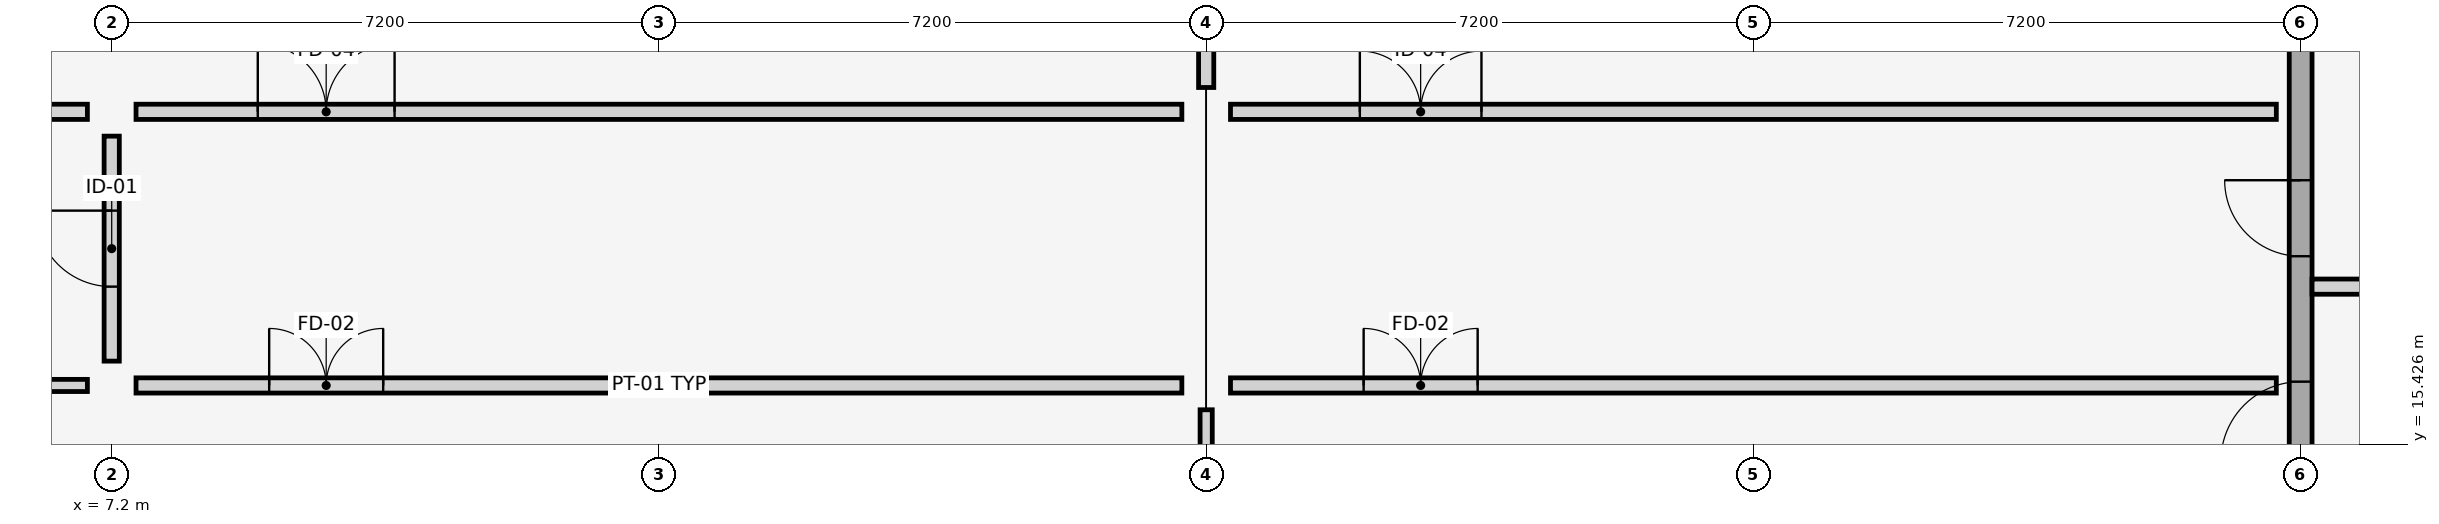
"""IFC4 building model, lengths in metres.
Left out: names, types, materials, properties, quantities, classifications, styles, units other than length and angle.
Written with IfcOpenShell. Run it as: python <this file> out.ifc"""

import sys

from ifc_helpers import new_model, si_unit, direction, frame, frame_2d, origin, place, context, subcontext, project, spatial, rectangle, extrude, element, fill, save


model = new_model("IFC4")
c1 = context("Model", 3, precision=1e-05, world=origin(), true_north=direction((0.0, 1.0)))
c2 = subcontext(c1, "Body", "Model", "MODEL_VIEW")
j1 = project(units=[si_unit("LENGTHUNIT", "METRE"), si_unit("PLANEANGLEUNIT", "RADIAN")], contexts=[c1])
p1 = place(None, origin())
s1 = spatial("IfcSite", under=j1, at=p1, CompositionType="ELEMENT")
p2 = place(p1, origin())
s2 = spatial("IfcBuilding", under=s1, at=p2, CompositionType="ELEMENT")
p3 = place(p2, frame((0.0, 0.0, -4.5)))
s3 = spatial("IfcBuildingStorey", under=s2, at=p3, CompositionType="ELEMENT", Elevation=-4.5)
p4 = place(p3, frame((36.0, 7.35, 0.0), z_axis=(0.0, 0.0, 1.0), x_axis=(0.0, 1.0, 0.0)))
e1 = element("IfcWall", 1, at=p4, inside=s3, PredefinedType="SHEAR", context=c2, shape_type="SweptSolid", body=[
    extrude(rectangle(XDim=14.1, YDim=0.3, at=frame_2d((7.05, 0.0))), origin(), (0.0, 0.0, 1.0), 4.25),
])
p5 = place(p4, frame((3.55, 0.0, 0.0)))
e2 = element("IfcOpeningElement", 2, at=p5, cuts=e1, PredefinedType="OPENING", context=c2, shape_type="SweptSolid", body=[
    extrude(rectangle(XDim=1.3, YDim=2.2, at=frame_2d((0.65, 1.1))), frame((0.0, 0.16, 0.0), z_axis=(0.0, -1.0, 0.0), x_axis=(1.0, 0.0, 0.0)), (0.0, 0.0, 1.0), 0.32),
])
p6 = place(p4, frame((7.85, 0.0, 0.0)))
e3 = element("IfcOpeningElement", 3, at=p6, cuts=e1, PredefinedType="OPENING", context=c2, shape_type="SweptSolid", body=[
    extrude(rectangle(XDim=1.05, YDim=2.15, at=frame_2d((0.525, 1.075))), frame((0.0, 0.16, 0.0), z_axis=(0.0, -1.0, 0.0), x_axis=(1.0, 0.0, 0.0)), (0.0, 0.0, 1.0), 0.32),
])
p7 = place(p4, frame((10.55, 0.0, 0.0)))
e4 = element("IfcOpeningElement", 4, at=p7, cuts=e1, PredefinedType="OPENING", context=c2, shape_type="SweptSolid", body=[
    extrude(rectangle(XDim=1.0, YDim=2.15, at=frame_2d((0.5, 1.075))), frame((0.0, 0.16, 0.0), z_axis=(0.0, -1.0, 0.0), x_axis=(1.0, 0.0, 0.0)), (0.0, 0.0, 1.0), 0.32),
])
p8 = place(p3, frame((36.15, 17.5, 0.0), z_axis=(0.0, 0.0, 1.0), x_axis=(1.0, 0.0, 0.0)))
e5 = element("IfcWall", 5, at=p8, inside=s3, PredefinedType="PLUMBINGWALL", context=c2, shape_type="SweptSolid", body=[
    extrude(rectangle(XDim=3.55, YDim=0.2, at=frame_2d((1.775, 0.0))), origin(), (0.0, 0.0, 1.0), 3.67),
])
p9 = place(p3, frame((7.52, 16.2, 0.0), z_axis=(0.0, 0.0, 1.0), x_axis=(1.0, 0.0, 0.0)))
e6 = element("IfcWall", 6, at=p9, inside=s3, PredefinedType="PARTITIONING", context=c2, shape_type="SweptSolid", body=[
    extrude(rectangle(XDim=13.76, YDim=0.2, at=frame_2d((6.88, 0.0))), origin(), (0.0, 0.0, 1.0), 3.45),
])
p10 = place(p9, frame((1.752, 0.0, 0.0)))
e7 = element("IfcOpeningElement", 7, at=p10, cuts=e6, PredefinedType="OPENING", context=c2, shape_type="SweptSolid", body=[
    extrude(rectangle(XDim=1.5, YDim=2.25, at=frame_2d((0.75, 1.125))), frame((0.0, 0.11, 0.0), z_axis=(0.0, -1.0, 0.0), x_axis=(1.0, 0.0, 0.0)), (0.0, 0.0, 1.0), 0.22),
])
p11 = place(p3, frame((7.52, 19.8, 0.0), z_axis=(0.0, 0.0, 1.0), x_axis=(1.0, 0.0, 0.0)))
e8 = element("IfcWall", 8, at=p11, inside=s3, PredefinedType="PARTITIONING", context=c2, shape_type="SweptSolid", body=[
    extrude(rectangle(XDim=13.76, YDim=0.2, at=frame_2d((6.88, 0.0))), origin(), (0.0, 0.0, 1.0), 3.45),
])
p12 = place(p11, frame((1.602, 0.0, 0.0)))
e9 = element("IfcOpeningElement", 9, at=p12, cuts=e8, PredefinedType="OPENING", context=c2, shape_type="SweptSolid", body=[
    extrude(rectangle(XDim=1.8, YDim=2.4, at=frame_2d((0.9, 1.2))), frame((0.0, 0.11, 0.0), z_axis=(0.0, -1.0, 0.0), x_axis=(1.0, 0.0, 0.0)), (0.0, 0.0, 1.0), 0.22),
])
p13 = place(p3, frame((7.2, 16.52, 0.0), z_axis=(0.0, 0.0, 1.0), x_axis=(0.0, 1.0, 0.0)))
e10 = element("IfcWall", 10, at=p13, inside=s3, PredefinedType="PARTITIONING", context=c2, shape_type="SweptSolid", body=[
    extrude(rectangle(XDim=2.96, YDim=0.2, at=frame_2d((1.48, 0.0))), origin(), (0.0, 0.0, 1.0), 3.45),
])
p14 = place(p13, frame((0.98, 0.0, 0.0)))
e11 = element("IfcOpeningElement", 11, at=p14, cuts=e10, PredefinedType="OPENING", context=c2, shape_type="SweptSolid", body=[
    extrude(rectangle(XDim=1.0, YDim=2.15, at=frame_2d((0.5, 1.075))), frame((0.0, 0.11, 0.0), z_axis=(0.0, -1.0, 0.0), x_axis=(1.0, 0.0, 0.0)), (0.0, 0.0, 1.0), 0.22),
])
p15 = place(p3, frame((21.92, 16.2, 0.0), z_axis=(0.0, 0.0, 1.0), x_axis=(1.0, 0.0, 0.0)))
e12 = element("IfcWall", 12, at=p15, inside=s3, PredefinedType="PARTITIONING", context=c2, shape_type="SweptSolid", body=[
    extrude(rectangle(XDim=13.76, YDim=0.2, at=frame_2d((6.88, 0.0))), origin(), (0.0, 0.0, 1.0), 3.45),
])
p16 = place(p15, frame((1.752, 0.0, 0.0)))
e13 = element("IfcOpeningElement", 13, at=p16, cuts=e12, PredefinedType="OPENING", context=c2, shape_type="SweptSolid", body=[
    extrude(rectangle(XDim=1.5, YDim=2.25, at=frame_2d((0.75, 1.125))), frame((0.0, 0.11, 0.0), z_axis=(0.0, -1.0, 0.0), x_axis=(1.0, 0.0, 0.0)), (0.0, 0.0, 1.0), 0.22),
])
p17 = place(p3, frame((21.92, 19.8, 0.0), z_axis=(0.0, 0.0, 1.0), x_axis=(1.0, 0.0, 0.0)))
e14 = element("IfcWall", 14, at=p17, inside=s3, PredefinedType="PARTITIONING", context=c2, shape_type="SweptSolid", body=[
    extrude(rectangle(XDim=13.76, YDim=0.2, at=frame_2d((6.88, 0.0))), origin(), (0.0, 0.0, 1.0), 3.45),
])
p18 = place(p17, frame((1.702, 0.0, 0.0)))
e15 = element("IfcOpeningElement", 15, at=p18, cuts=e14, PredefinedType="OPENING", context=c2, shape_type="SweptSolid", body=[
    extrude(rectangle(XDim=1.6, YDim=2.35, at=frame_2d((0.8, 1.175))), frame((0.0, 0.11, 0.0), z_axis=(0.0, -1.0, 0.0), x_axis=(1.0, 0.0, 0.0)), (0.0, 0.0, 1.0), 0.22),
])
p19 = place(p3, frame((0.32, 16.2, 0.0), z_axis=(0.0, 0.0, 1.0), x_axis=(1.0, 0.0, 0.0)))
e16 = element("IfcWall", 16, at=p19, inside=s3, PredefinedType="PARTITIONING", context=c2, shape_type="SweptSolid", body=[
    extrude(rectangle(XDim=6.56, YDim=0.16, at=frame_2d((3.28, 0.0))), origin(), (0.0, 0.0, 1.0), 3.45),
])
p20 = place(p19, frame((2.155, 0.0, 0.0)))
e17 = element("IfcOpeningElement", 17, at=p20, cuts=e16, PredefinedType="OPENING", context=c2, shape_type="SweptSolid", body=[
    extrude(rectangle(XDim=2.25, YDim=2.7, at=frame_2d((1.125, 1.35))), frame((0.0, 0.09, 0.0), z_axis=(0.0, -1.0, 0.0), x_axis=(1.0, 0.0, 0.0)), (0.0, 0.0, 1.0), 0.18),
])
p21 = place(p3, frame((21.6, 0.32, 0.0), z_axis=(0.0, 0.0, 1.0), x_axis=(0.0, 1.0, 0.0)))
e18 = element("IfcWall", 18, at=p21, inside=s3, PredefinedType="PARTITIONING", context=c2, shape_type="SweptSolid", body=[
    extrude(rectangle(XDim=15.56, YDim=0.16, at=frame_2d((7.78, 0.0))), origin(), (0.0, 0.0, 1.0), 3.45),
])
p22 = place(p21, frame((1.843, 0.0, 0.0)))
e19 = element("IfcOpeningElement", 19, at=p22, cuts=e18, PredefinedType="OPENING", context=c2, shape_type="SweptSolid", body=[
    extrude(rectangle(XDim=1.5, YDim=2.25, at=frame_2d((0.75, 1.125))), frame((0.0, 0.09, 0.0), z_axis=(0.0, -1.0, 0.0), x_axis=(1.0, 0.0, 0.0)), (0.0, 0.0, 1.0), 0.18),
])
p23 = place(p3, frame((0.32, 19.8, 0.0), z_axis=(0.0, 0.0, 1.0), x_axis=(1.0, 0.0, 0.0)))
e20 = element("IfcWall", 20, at=p23, inside=s3, PredefinedType="PARTITIONING", context=c2, shape_type="SweptSolid", body=[
    extrude(rectangle(XDim=6.56, YDim=0.2, at=frame_2d((3.28, 0.0))), origin(), (0.0, 0.0, 1.0), 3.45),
])
p24 = place(p23, frame((2.38, 0.0, 0.0)))
e21 = element("IfcOpeningElement", 21, at=p24, cuts=e20, PredefinedType="OPENING", context=c2, shape_type="SweptSolid", body=[
    extrude(rectangle(XDim=1.8, YDim=2.4, at=frame_2d((0.9, 1.2))), frame((0.0, 0.11, 0.0), z_axis=(0.0, -1.0, 0.0), x_axis=(1.0, 0.0, 0.0)), (0.0, 0.0, 1.0), 0.22),
])
p25 = place(p3, frame((21.6, 20.12, 0.0), z_axis=(0.0, 0.0, 1.0), x_axis=(0.0, 1.0, 0.0)))
e22 = element("IfcWall", 22, at=p25, inside=s3, PredefinedType="PARTITIONING", context=c2, shape_type="SweptSolid", body=[
    extrude(rectangle(XDim=8.36, YDim=0.2, at=frame_2d((4.18, 0.0))), origin(), (0.0, 0.0, 1.0), 3.45),
])
p26 = place(p25, frame((3.28, 0.0, 0.0)))
e23 = element("IfcOpeningElement", 23, at=p26, cuts=e22, PredefinedType="OPENING", context=c2, shape_type="SweptSolid", body=[
    extrude(rectangle(XDim=1.8, YDim=2.4, at=frame_2d((0.9, 1.2))), frame((0.0, 0.11, 0.0), z_axis=(0.0, -1.0, 0.0), x_axis=(1.0, 0.0, 0.0)), (0.0, 0.0, 1.0), 0.22),
])
p27 = place(p6, origin())
e24 = element("IfcDoor", 24, at=p27, inside=s3, OperationType="SINGLE_SWING_LEFT", PredefinedType="DOOR", context=c2, shape_type="SweptSolid", body=[
    extrude(rectangle(XDim=1.05, YDim=2.15, at=frame_2d((0.525, 1.075))), frame((0.0, 0.025, 0.0), z_axis=(0.0, -1.0, 0.0), x_axis=(1.0, 0.0, 0.0)), (0.0, 0.0, 1.0), 0.05),
])
fill(e3, e24)
p28 = place(p7, origin())
e25 = element("IfcDoor", 25, at=p28, inside=s3, OperationType="SINGLE_SWING_RIGHT", PredefinedType="DOOR", context=c2, shape_type="SweptSolid", body=[
    extrude(rectangle(XDim=1.0, YDim=2.15, at=frame_2d((0.5, 1.075))), frame((0.0, 0.025, 0.0), z_axis=(0.0, -1.0, 0.0), x_axis=(1.0, 0.0, 0.0)), (0.0, 0.0, 1.0), 0.05),
])
fill(e4, e25)
p29 = place(p10, origin())
e26 = element("IfcDoor", 26, at=p29, inside=s3, OperationType="DOUBLE_DOOR_SINGLE_SWING", PredefinedType="DOOR", context=c2, shape_type="SweptSolid", body=[
    extrude(rectangle(XDim=1.5, YDim=2.25, at=frame_2d((0.75, 1.125))), frame((0.0, 0.025, 0.0), z_axis=(0.0, -1.0, 0.0), x_axis=(1.0, 0.0, 0.0)), (0.0, 0.0, 1.0), 0.05),
])
fill(e7, e26)
p30 = place(p12, origin())
e27 = element("IfcDoor", 27, at=p30, inside=s3, OperationType="DOUBLE_DOOR_SINGLE_SWING", PredefinedType="DOOR", context=c2, shape_type="SweptSolid", body=[
    extrude(rectangle(XDim=1.8, YDim=2.4, at=frame_2d((0.9, 1.2))), frame((0.0, 0.025, 0.0), z_axis=(0.0, -1.0, 0.0), x_axis=(1.0, 0.0, 0.0)), (0.0, 0.0, 1.0), 0.05),
])
fill(e9, e27)
p31 = place(p14, origin())
e28 = element("IfcDoor", 28, at=p31, inside=s3, OperationType="SINGLE_SWING_RIGHT", PredefinedType="DOOR", context=c2, shape_type="SweptSolid", body=[
    extrude(rectangle(XDim=1.0, YDim=2.15, at=frame_2d((0.5, 1.075))), frame((0.0, 0.025, 0.0), z_axis=(0.0, -1.0, 0.0), x_axis=(1.0, 0.0, 0.0)), (0.0, 0.0, 1.0), 0.05),
])
fill(e11, e28)
p32 = place(p16, origin())
e29 = element("IfcDoor", 29, at=p32, inside=s3, OperationType="DOUBLE_DOOR_SINGLE_SWING", PredefinedType="DOOR", context=c2, shape_type="SweptSolid", body=[
    extrude(rectangle(XDim=1.5, YDim=2.25, at=frame_2d((0.75, 1.125))), frame((0.0, 0.025, 0.0), z_axis=(0.0, -1.0, 0.0), x_axis=(1.0, 0.0, 0.0)), (0.0, 0.0, 1.0), 0.05),
])
fill(e13, e29)
p33 = place(p18, origin())
e30 = element("IfcDoor", 30, at=p33, inside=s3, OperationType="DOUBLE_DOOR_SINGLE_SWING", PredefinedType="DOOR", context=c2, shape_type="SweptSolid", body=[
    extrude(rectangle(XDim=1.6, YDim=2.35, at=frame_2d((0.8, 1.175))), frame((0.0, 0.025, 0.0), z_axis=(0.0, -1.0, 0.0), x_axis=(1.0, 0.0, 0.0)), (0.0, 0.0, 1.0), 0.05),
])
fill(e15, e30)
save(model, sys.argv[1])
